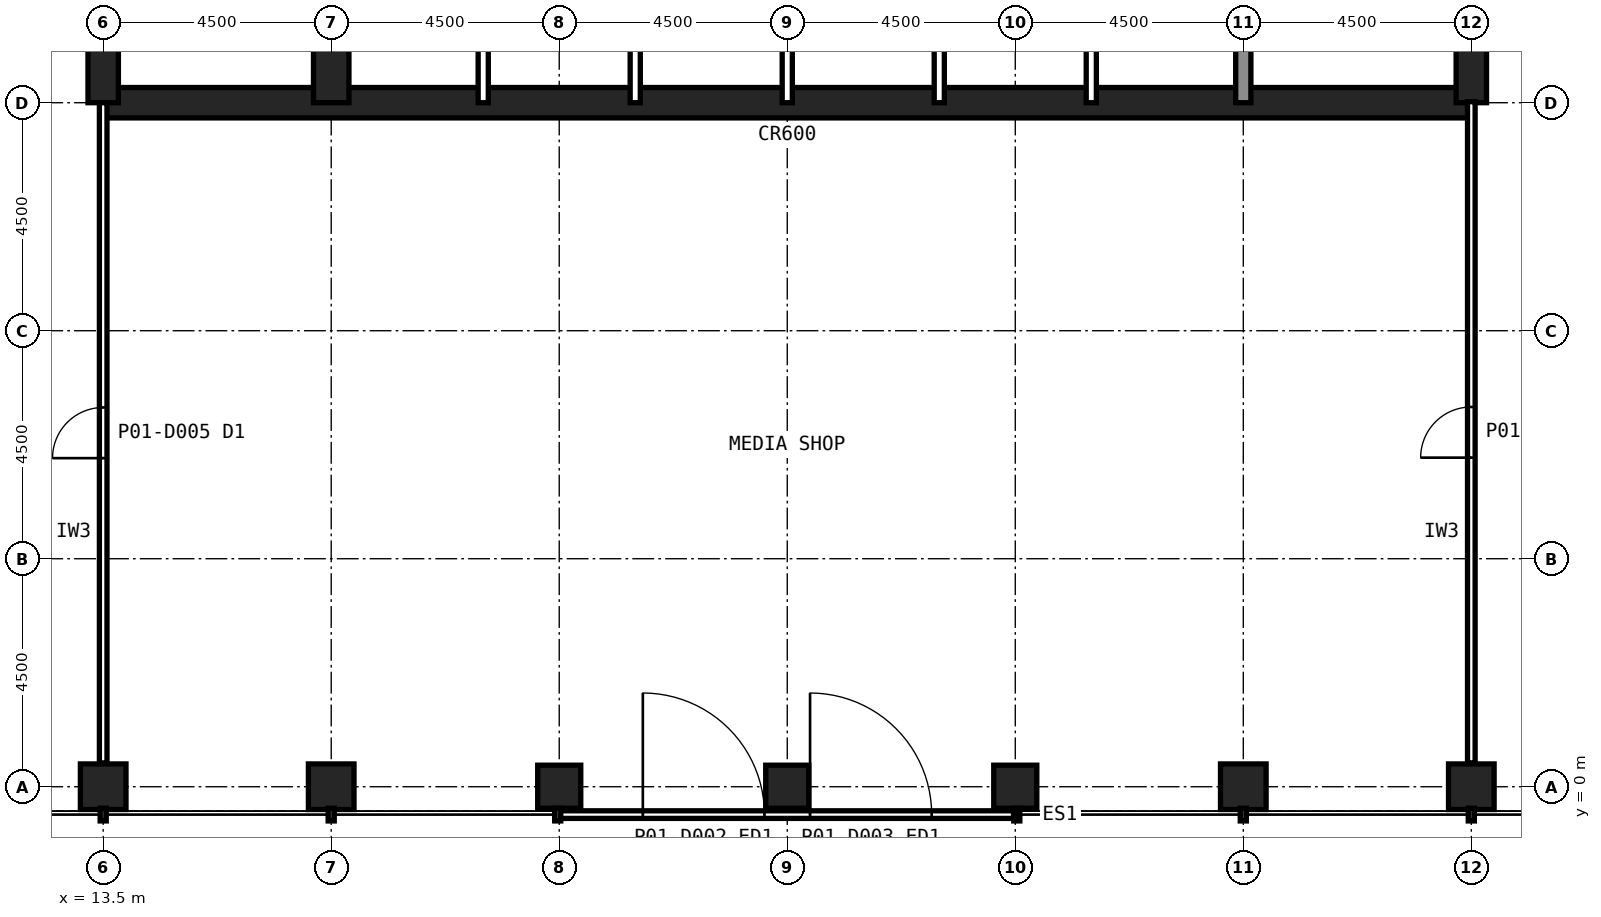
"""IFC4 building model, lengths in metres.
Left out: names, types, materials, properties, quantities, classifications, styles, units other than length and angle.
Written with IfcOpenShell. Run it as: python <this file> out.ifc"""

import sys

from ifc_helpers import new_model, si_unit, direction, frame, frame_2d, origin, origin_2d, place, context, subcontext, project, spatial, rectangle, hollow_rectangle, extrude, element, fill, save


model = new_model("IFC4")
c1 = context("Model", 3, precision=1e-05, world=origin(), true_north=direction((0.0, 1.0)))
c2 = subcontext(c1, "Body", "Model", "MODEL_VIEW")
j1 = project(units=[si_unit("LENGTHUNIT", "METRE"), si_unit("PLANEANGLEUNIT", "RADIAN")], contexts=[c1])
p1 = place(None, origin())
s1 = spatial("IfcSite", under=j1, at=p1, CompositionType="ELEMENT")
p2 = place(p1, origin())
s2 = spatial("IfcBuilding", under=s1, at=p2, CompositionType="ELEMENT")
p3 = place(p2, origin())
s3 = spatial("IfcBuildingStorey", under=s2, at=p3, CompositionType="ELEMENT", Elevation=0.0)
for number, where, z_axis, x_axis in (
    (1, (13.5, 0.0, -0.25), (0.0, 0.0, 1.0), (1.0, 0.0, 0.0)),
    (2, (18.0, 0.0, -0.25), (0.0, 0.0, 1.0), (1.0, 0.0, 0.0)),
):
    element("IfcColumn", number, at=place(p3, frame(where, z_axis=z_axis, x_axis=x_axis)), inside=s3, PredefinedType="COLUMN", context=c2, shape_type="SweptSolid", body=[
        extrude(hollow_rectangle(XDim=0.9, YDim=0.9, WallThickness=0.063, at=origin_2d()), origin(), (0.0, 0.0, 1.0), 6.25),
    ])
for number, where, z_axis, x_axis in (
    (3, (22.5, 0.0, -0.25), (0.0, 0.0, 1.0), (1.0, 0.0, 0.0)),
    (4, (27.0, 0.0, -0.25), (0.0, 0.0, 1.0), (1.0, 0.0, 0.0)),
    (5, (31.5, 0.0, -0.25), (0.0, 0.0, 1.0), (1.0, 0.0, 0.0)),
):
    element("IfcColumn", number, at=place(p3, frame(where, z_axis=z_axis, x_axis=x_axis)), inside=s3, PredefinedType="COLUMN", context=c2, shape_type="SweptSolid", body=[
        extrude(hollow_rectangle(XDim=0.85, YDim=0.85, WallThickness=0.05, at=origin_2d()), origin(), (0.0, 0.0, 1.0), 6.25),
    ])
for number, where, z_axis, x_axis in (
    (6, (36.0, 0.0, -0.25), (0.0, 0.0, 1.0), (1.0, 0.0, 0.0)),
    (7, (40.5, 0.0, -0.25), (0.0, 0.0, 1.0), (1.0, 0.0, 0.0)),
):
    element("IfcColumn", number, at=place(p3, frame(where, z_axis=z_axis, x_axis=x_axis)), inside=s3, PredefinedType="COLUMN", context=c2, shape_type="SweptSolid", body=[
        extrude(hollow_rectangle(XDim=0.9, YDim=0.9, WallThickness=0.063, at=origin_2d()), origin(), (0.0, 0.0, 1.0), 6.25),
    ])
p4 = place(p3, frame((13.5, 13.5, -0.25), z_axis=(0.0, 0.0, 1.0), x_axis=(1.0, 0.0, 0.0)))
e8 = element("IfcWall", 8, at=p4, inside=s3, PredefinedType="SHEAR", context=c2, shape_type="SweptSolid", body=[
    extrude(rectangle(XDim=27.0, YDim=0.6, at=frame_2d((13.5, 0.0))), origin(), (0.0, 0.0, 1.0), 6.25),
])
p5 = place(p3, frame((40.5, 13.5, -0.25), z_axis=(0.0, 0.0, 1.0), x_axis=(0.0, 1.0, 0.0)))
e9 = element("IfcWall", 9, at=p5, inside=s3, PredefinedType="SHEAR", context=c2, shape_type="SweptSolid", body=[
    extrude(rectangle(XDim=27.0, YDim=0.6, at=frame_2d((13.5, 0.0))), origin(), (0.0, 0.0, 1.0), 6.25),
])
p6 = place(p5, frame((5.85, 0.0, 0.25)))
e10 = element("IfcOpeningElement", 10, at=p6, cuts=e9, PredefinedType="OPENING", context=c2, shape_type="SweptSolid", body=[
    extrude(rectangle(XDim=1.8, YDim=2.1, at=frame_2d((0.9, 1.05))), frame((0.0, 0.31, 0.0), z_axis=(0.0, -1.0, 0.0), x_axis=(1.0, 0.0, 0.0)), (0.0, 0.0, 1.0), 0.62),
])
p7 = place(p5, frame((19.65, 0.0, 0.25)))
e11 = element("IfcOpeningElement", 11, at=p7, cuts=e9, PredefinedType="OPENING", context=c2, shape_type="SweptSolid", body=[
    extrude(rectangle(XDim=1.2, YDim=2.1, at=frame_2d((0.6, 1.05))), frame((0.0, 0.31, 0.0), z_axis=(0.0, -1.0, 0.0), x_axis=(1.0, 0.0, 0.0)), (0.0, 0.0, 1.0), 0.62),
])
p8 = place(p3, frame((13.5, 40.5, -0.25), z_axis=(0.0, 0.0, 1.0), x_axis=(0.0, -1.0, 0.0)))
e12 = element("IfcWall", 12, at=p8, inside=s3, PredefinedType="SHEAR", context=c2, shape_type="SweptSolid", body=[
    extrude(rectangle(XDim=27.0, YDim=0.6, at=frame_2d((13.5, 0.0))), origin(), (0.0, 0.0, 1.0), 6.25),
])
p9 = place(p8, frame((19.65, 0.0, 0.25)))
e13 = element("IfcOpeningElement", 13, at=p9, cuts=e12, PredefinedType="OPENING", context=c2, shape_type="SweptSolid", body=[
    extrude(rectangle(XDim=1.2, YDim=2.1, at=frame_2d((0.6, 1.05))), frame((0.0, 0.31, 0.0), z_axis=(0.0, -1.0, 0.0), x_axis=(1.0, 0.0, 0.0)), (0.0, 0.0, 1.0), 0.62),
])
p10 = place(p8, frame((5.85, 0.0, 0.25)))
e14 = element("IfcOpeningElement", 14, at=p10, cuts=e12, PredefinedType="OPENING", context=c2, shape_type="SweptSolid", body=[
    extrude(rectangle(XDim=1.8, YDim=2.1, at=frame_2d((0.9, 1.05))), frame((0.0, 0.31, 0.0), z_axis=(0.0, -1.0, 0.0), x_axis=(1.0, 0.0, 0.0)), (0.0, 0.0, 1.0), 0.62),
])
p11 = place(p3, frame((18.0, 13.5, -0.25), z_axis=(0.0, 0.0, 1.0), x_axis=(0.0, 1.0, 0.0)))
e15 = element("IfcWall", 15, at=p11, inside=s3, PredefinedType="SHEAR", context=c2, shape_type="SweptSolid", body=[
    extrude(rectangle(XDim=18.0, YDim=0.7, at=frame_2d((9.0, 0.0))), origin(), (0.0, 0.0, 1.0), 6.25),
])
p12 = place(p3, frame((36.0, 13.5, -0.25), z_axis=(0.0, 0.0, 1.0), x_axis=(0.0, 1.0, 0.0)))
e16 = element("IfcWall", 16, at=p12, inside=s3, PredefinedType="SOLIDWALL", context=c2, shape_type="SweptSolid", body=[
    extrude(rectangle(XDim=4.5, YDim=0.3, at=frame_2d((2.25, 0.0))), origin(), (0.0, 0.0, 1.0), 6.05),
])
p13 = place(p3, frame((22.5, -0.55, 0.0), z_axis=(0.0, 0.0, 1.0), x_axis=(1.0, 0.0, 0.0)))
e17 = element("IfcWall", 17, at=p13, inside=s3, PredefinedType="USERDEFINED", context=c2, shape_type="SweptSolid", body=[
    extrude(rectangle(XDim=9.0, YDim=0.15, at=frame_2d((4.5, 0.0))), origin(), (0.0, 0.0, 1.0), 6.0),
])
p14 = place(p13, frame((1.65, 0.0, 0.0)))
e18 = element("IfcOpeningElement", 18, at=p14, cuts=e17, PredefinedType="OPENING", context=c2, shape_type="SweptSolid", body=[
    extrude(rectangle(XDim=2.4, YDim=2.7, at=frame_2d((1.2, 1.35))), frame((0.0, 0.085, 0.0), z_axis=(0.0, -1.0, 0.0), x_axis=(1.0, 0.0, 0.0)), (0.0, 0.0, 1.0), 0.17),
])
p15 = place(p13, frame((4.95, 0.0, 0.0)))
e19 = element("IfcOpeningElement", 19, at=p15, cuts=e17, PredefinedType="OPENING", context=c2, shape_type="SweptSolid", body=[
    extrude(rectangle(XDim=2.4, YDim=2.7, at=frame_2d((1.2, 1.35))), frame((0.0, 0.085, 0.0), z_axis=(0.0, -1.0, 0.0), x_axis=(1.0, 0.0, 0.0)), (0.0, 0.0, 1.0), 0.17),
])
for number, where, z_axis, x_axis in (
    (20, (21.0, 13.5, -0.25), (0.0, 0.0, 1.0), (0.0, 1.0, 0.0)),
    (21, (24.0, 13.5, -0.25), (0.0, 0.0, 1.0), (0.0, 1.0, 0.0)),
    (22, (27.0, 13.5, -0.25), (0.0, 0.0, 1.0), (0.0, 1.0, 0.0)),
    (23, (30.0, 13.5, -0.25), (0.0, 0.0, 1.0), (0.0, 1.0, 0.0)),
    (24, (33.0, 13.5, -0.25), (0.0, 0.0, 1.0), (0.0, 1.0, 0.0)),
):
    element("IfcWall", number, at=place(p3, frame(where, z_axis=z_axis, x_axis=x_axis)), inside=s3, PredefinedType="PARTITIONING", context=c2, shape_type="SweptSolid", body=[
        extrude(rectangle(XDim=4.5, YDim=0.2, at=frame_2d((2.25, 0.0))), origin(), (0.0, 0.0, 1.0), 6.05),
    ])
p16 = place(p3, frame((40.5, 0.47, 0.0), z_axis=(0.0, 0.0, 1.0), x_axis=(0.0, 1.0, 0.0)))
e25 = element("IfcWall", 25, at=p16, inside=s3, PredefinedType="PARTITIONING", context=c2, shape_type="SweptSolid", body=[
    extrude(rectangle(XDim=13.05, YDim=0.15, at=frame_2d((6.525, 0.0))), origin(), (0.0, 0.0, 1.0), 4.881),
])
p17 = place(p16, frame((6.025, 0.0, 0.0)))
e26 = element("IfcOpeningElement", 26, at=p17, cuts=e25, PredefinedType="OPENING", context=c2, shape_type="SweptSolid", body=[
    extrude(rectangle(XDim=1.0, YDim=2.1, at=frame_2d((0.5, 1.05))), frame((0.0, 0.085, 0.0), z_axis=(0.0, -1.0, 0.0), x_axis=(1.0, 0.0, 0.0)), (0.0, 0.0, 1.0), 0.17),
])
p18 = place(p3, frame((13.5, 0.47, 0.0), z_axis=(0.0, 0.0, 1.0), x_axis=(0.0, 1.0, 0.0)))
e27 = element("IfcWall", 27, at=p18, inside=s3, PredefinedType="PARTITIONING", context=c2, shape_type="SweptSolid", body=[
    extrude(rectangle(XDim=13.03, YDim=0.15, at=frame_2d((6.515, 0.0))), origin(), (0.0, 0.0, 1.0), 4.881),
])
p19 = place(p18, frame((6.015, 0.0, 0.0)))
e28 = element("IfcOpeningElement", 28, at=p19, cuts=e27, PredefinedType="OPENING", context=c2, shape_type="SweptSolid", body=[
    extrude(rectangle(XDim=1.0, YDim=2.1, at=frame_2d((0.5, 1.05))), frame((0.0, 0.085, 0.0), z_axis=(0.0, -1.0, 0.0), x_axis=(1.0, 0.0, 0.0)), (0.0, 0.0, 1.0), 0.17),
])
p20 = place(p14, origin())
e29 = element("IfcDoor", 29, at=p20, inside=s3, OperationType="SINGLE_SWING_LEFT", PredefinedType="DOOR", context=c2, shape_type="SweptSolid", body=[
    extrude(rectangle(XDim=2.4, YDim=2.7, at=frame_2d((1.2, 1.35))), frame((0.0, 0.025, 0.0), z_axis=(0.0, -1.0, 0.0), x_axis=(1.0, 0.0, 0.0)), (0.0, 0.0, 1.0), 0.05),
])
fill(e18, e29)
p21 = place(p15, origin())
e30 = element("IfcDoor", 30, at=p21, inside=s3, OperationType="SINGLE_SWING_LEFT", PredefinedType="DOOR", context=c2, shape_type="SweptSolid", body=[
    extrude(rectangle(XDim=2.4, YDim=2.7, at=frame_2d((1.2, 1.35))), frame((0.0, 0.025, 0.0), z_axis=(0.0, -1.0, 0.0), x_axis=(1.0, 0.0, 0.0)), (0.0, 0.0, 1.0), 0.05),
])
fill(e19, e30)
p22 = place(p17, origin())
e31 = element("IfcDoor", 31, at=p22, inside=s3, OperationType="SINGLE_SWING_LEFT", PredefinedType="DOOR", context=c2, shape_type="SweptSolid", body=[
    extrude(rectangle(XDim=1.0, YDim=2.1, at=frame_2d((0.5, 1.05))), frame((0.0, 0.025, 0.0), z_axis=(0.0, -1.0, 0.0), x_axis=(1.0, 0.0, 0.0)), (0.0, 0.0, 1.0), 0.05),
])
fill(e26, e31)
p23 = place(p19, origin())
e32 = element("IfcDoor", 32, at=p23, inside=s3, OperationType="SINGLE_SWING_LEFT", PredefinedType="DOOR", context=c2, shape_type="SweptSolid", body=[
    extrude(rectangle(XDim=1.0, YDim=2.1, at=frame_2d((0.5, 1.05))), frame((0.0, 0.025, 0.0), z_axis=(0.0, -1.0, 0.0), x_axis=(1.0, 0.0, 0.0)), (0.0, 0.0, 1.0), 0.05),
])
fill(e28, e32)
save(model, sys.argv[1])
